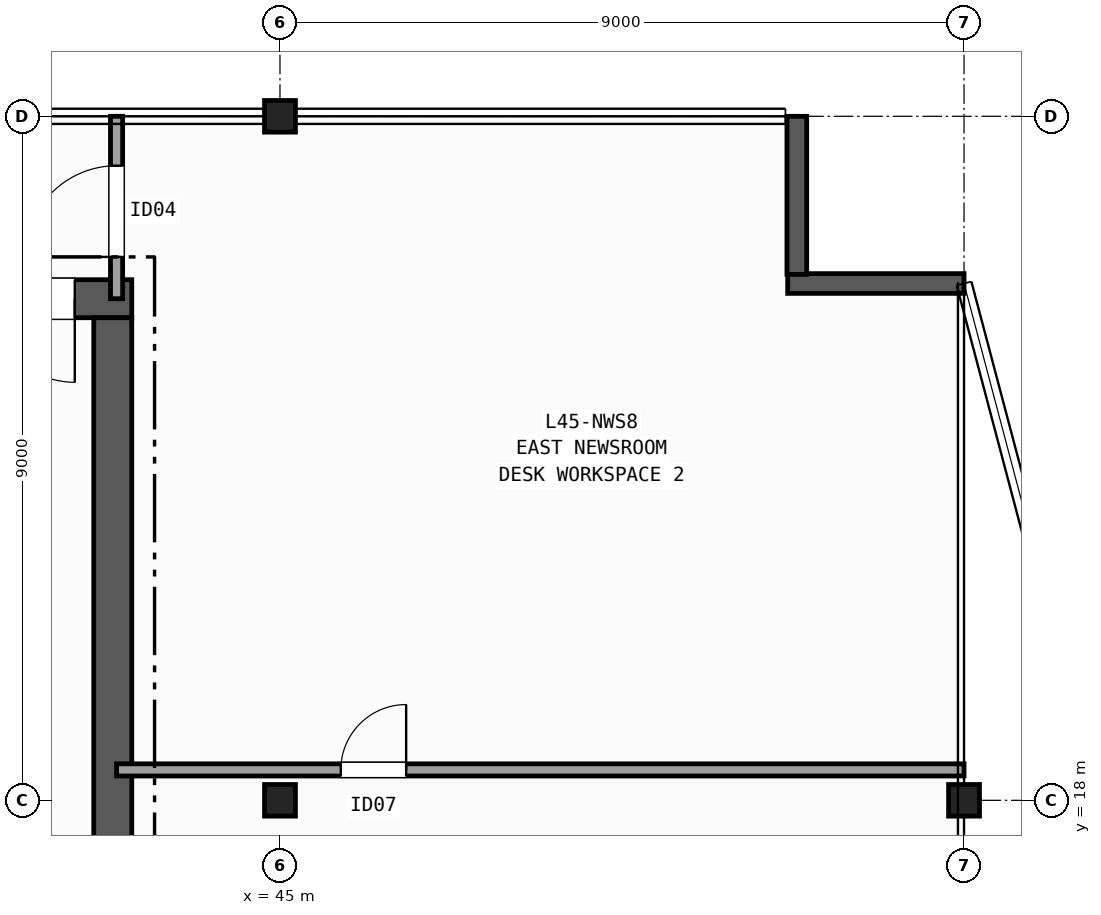
"""IFC4 building model, lengths in metres.
Left out: names, types, materials, properties, quantities, classifications, styles, units other than length and angle.
Written with IfcOpenShell. Run it as: python <this file> out.ifc"""

import sys

from ifc_helpers import new_model, si_unit, direction, frame, frame_2d, origin, origin_2d, place, context, subcontext, project, spatial, rectangle, i_section, extrude, element, fill, save


model = new_model("IFC4")
c1 = context("Model", 3, precision=1e-05, world=origin(), true_north=direction((0.0, 1.0)))
c2 = subcontext(c1, "Body", "Model", "MODEL_VIEW")
j1 = project(units=[si_unit("LENGTHUNIT", "METRE"), si_unit("PLANEANGLEUNIT", "RADIAN")], contexts=[c1])
p1 = place(None, origin())
s1 = spatial("IfcSite", under=j1, at=p1, CompositionType="ELEMENT")
p2 = place(p1, origin())
s2 = spatial("IfcBuilding", under=s1, at=p2, CompositionType="ELEMENT")
p3 = place(p2, frame((0.0, 0.0, 181.6)))
s3 = spatial("IfcBuildingStorey", under=s2, at=p3, CompositionType="ELEMENT", Elevation=181.6)
for number, where, z_axis, x_axis in (
    (1, (45.0, 18.0, 0.0), (0.0, 0.0, 1.0), (1.0, 0.0, 0.0)),
    (2, (45.0, 27.0, 0.0), (0.0, 0.0, 1.0), (1.0, 0.0, 0.0)),
    (3, (54.0, 18.0, 0.0), (0.0, 0.0, 1.0), (1.0, 0.0, 0.0)),
):
    element("IfcColumn", number, at=place(p3, frame(where, z_axis=z_axis, x_axis=x_axis)), inside=s3, PredefinedType="COLUMN", context=c2, shape_type="SweptSolid", body=[
        extrude(i_section(OverallWidth=0.406, OverallDepth=0.416, WebThickness=0.03, FlangeThickness=0.048, FilletRadius=0.015, at=origin_2d()), origin(), (0.0, 0.0, 1.0), 3.7),
    ])
p4 = place(p3, frame((54.0, 24.8, 0.0), z_axis=(0.0, 0.0, 1.0), x_axis=(-1.0, 0.0, 0.0)))
e4 = element("IfcWall", 4, at=p4, inside=s3, PredefinedType="SOLIDWALL", context=c2, shape_type="SweptSolid", body=[
    extrude(rectangle(XDim=2.32, YDim=0.26, at=frame_2d((1.16, 0.0))), origin(), (0.0, 0.0, 1.0), 3.42),
])
p5 = place(p3, frame((51.8, 24.92, 0.0), z_axis=(0.0, 0.0, 1.0), x_axis=(0.0, 1.0, 0.0)))
e5 = element("IfcWall", 5, at=p5, inside=s3, PredefinedType="SOLIDWALL", context=c2, shape_type="SweptSolid", body=[
    extrude(rectangle(XDim=2.08, YDim=0.26, at=frame_2d((1.04, 0.0))), origin(), (0.0, 0.0, 1.0), 3.42),
])
p6 = place(p3, frame((43.05, 24.6, 0.0), z_axis=(0.0, 0.0, 1.0), x_axis=(-1.0, 0.0, 0.0)))
e6 = element("IfcWall", 6, at=p6, inside=s3, PredefinedType="SHEAR", context=c2, shape_type="SweptSolid", body=[
    extrude(rectangle(XDim=13.9, YDim=0.5, at=frame_2d((6.95, 0.0))), origin(), (0.0, 0.0, 1.0), 3.42),
])
p7 = place(p6, frame((0.75, 0.0, 0.0)))
e7 = element("IfcOpeningElement", 7, at=p7, cuts=e6, PredefinedType="OPENING", context=c2, shape_type="SweptSolid", body=[
    extrude(rectangle(XDim=1.1, YDim=2.15, at=frame_2d((0.55, 1.075))), frame((0.0, 0.26, 0.0), z_axis=(0.0, -1.0, 0.0), x_axis=(1.0, 0.0, 0.0)), (0.0, 0.0, 1.0), 0.52),
])
p8 = place(p6, frame((2.25, 0.0, 0.0)))
e8 = element("IfcOpeningElement", 8, at=p8, cuts=e6, PredefinedType="OPENING", context=c2, shape_type="SweptSolid", body=[
    extrude(rectangle(XDim=0.9, YDim=2.1, at=frame_2d((0.45, 1.05))), frame((0.0, 0.26, 0.0), z_axis=(0.0, -1.0, 0.0), x_axis=(1.0, 0.0, 0.0)), (0.0, 0.0, 1.0), 0.52),
])
p9 = place(p6, frame((3.55, 0.0, 0.0)))
e9 = element("IfcOpeningElement", 9, at=p9, cuts=e6, PredefinedType="OPENING", context=c2, shape_type="SweptSolid", body=[
    extrude(rectangle(XDim=0.9, YDim=2.1, at=frame_2d((0.45, 1.05))), frame((0.0, 0.26, 0.0), z_axis=(0.0, -1.0, 0.0), x_axis=(1.0, 0.0, 0.0)), (0.0, 0.0, 1.0), 0.52),
])
p10 = place(p6, frame((4.9, 0.0, 0.0)))
e10 = element("IfcOpeningElement", 10, at=p10, cuts=e6, PredefinedType="OPENING", context=c2, shape_type="SweptSolid", body=[
    extrude(rectangle(XDim=0.9, YDim=2.1, at=frame_2d((0.45, 1.05))), frame((0.0, 0.26, 0.0), z_axis=(0.0, -1.0, 0.0), x_axis=(1.0, 0.0, 0.0)), (0.0, 0.0, 1.0), 0.52),
])
p11 = place(p3, frame((42.8, 11.45, 0.0), z_axis=(0.0, 0.0, 1.0), x_axis=(0.0, 1.0, 0.0)))
e11 = element("IfcWall", 11, at=p11, inside=s3, PredefinedType="SHEAR", context=c2, shape_type="SweptSolid", body=[
    extrude(rectangle(XDim=12.9, YDim=0.5, at=frame_2d((6.45, 0.0))), origin(), (0.0, 0.0, 1.0), 3.42),
])
p12 = place(p3, frame((42.85, 24.6, 0.0), z_axis=(0.0, 0.0, 1.0), x_axis=(0.0, 1.0, 0.0)))
e12 = element("IfcWall", 12, at=p12, inside=s3, PredefinedType="PARTITIONING", context=c2, shape_type="SweptSolid", body=[
    extrude(rectangle(XDim=2.4, YDim=0.16, at=frame_2d((1.2, 0.0))), origin(), (0.0, 0.0, 1.0), 2.634),
])
p13 = place(p12, frame((0.55, 0.0, 0.0)))
e13 = element("IfcOpeningElement", 13, at=p13, cuts=e12, PredefinedType="OPENING", context=c2, shape_type="SweptSolid", body=[
    extrude(rectangle(XDim=1.2, YDim=2.15, at=frame_2d((0.6, 1.075))), frame((0.0, 0.09, 0.0), z_axis=(0.0, -1.0, 0.0), x_axis=(1.0, 0.0, 0.0)), (0.0, 0.0, 1.0), 0.18),
])
p14 = place(p3, frame((42.85, 18.4, 0.0), z_axis=(0.0, 0.0, 1.0), x_axis=(1.0, 0.0, 0.0)))
e14 = element("IfcWall", 14, at=p14, inside=s3, PredefinedType="PARTITIONING", context=c2, shape_type="SweptSolid", body=[
    extrude(rectangle(XDim=11.15, YDim=0.16, at=frame_2d((5.575, 0.0))), origin(), (0.0, 0.0, 1.0), 3.42),
])
p15 = place(p14, frame((2.95, 0.0, 0.0)))
e15 = element("IfcOpeningElement", 15, at=p15, cuts=e14, PredefinedType="OPENING", context=c2, shape_type="SweptSolid", body=[
    extrude(rectangle(XDim=0.86, YDim=2.05, at=frame_2d((0.43, 1.025))), frame((0.0, 0.09, 0.0), z_axis=(0.0, -1.0, 0.0), x_axis=(1.0, 0.0, 0.0)), (0.0, 0.0, 1.0), 0.18),
])
p16 = place(p7, origin())
e16 = element("IfcDoor", 16, at=p16, inside=s3, OperationType="SINGLE_SWING_LEFT", PredefinedType="DOOR", context=c2, shape_type="SweptSolid", body=[
    extrude(rectangle(XDim=1.1, YDim=2.15, at=frame_2d((0.55, 1.075))), frame((0.0, 0.025, 0.0), z_axis=(0.0, -1.0, 0.0), x_axis=(1.0, 0.0, 0.0)), (0.0, 0.0, 1.0), 0.05),
])
fill(e7, e16)
p17 = place(p13, origin())
e17 = element("IfcDoor", 17, at=p17, inside=s3, OperationType="SINGLE_SWING_LEFT", PredefinedType="DOOR", context=c2, shape_type="SweptSolid", body=[
    extrude(rectangle(XDim=1.2, YDim=2.15, at=frame_2d((0.6, 1.075))), frame((0.0, 0.025, 0.0), z_axis=(0.0, -1.0, 0.0), x_axis=(1.0, 0.0, 0.0)), (0.0, 0.0, 1.0), 0.05),
])
fill(e13, e17)
p18 = place(p15, origin())
e18 = element("IfcDoor", 18, at=p18, inside=s3, OperationType="SINGLE_SWING_RIGHT", PredefinedType="DOOR", context=c2, shape_type="SweptSolid", body=[
    extrude(rectangle(XDim=0.86, YDim=2.05, at=frame_2d((0.43, 1.025))), frame((0.0, 0.025, 0.0), z_axis=(0.0, -1.0, 0.0), x_axis=(1.0, 0.0, 0.0)), (0.0, 0.0, 1.0), 0.05),
])
fill(e15, e18)
save(model, sys.argv[1])
